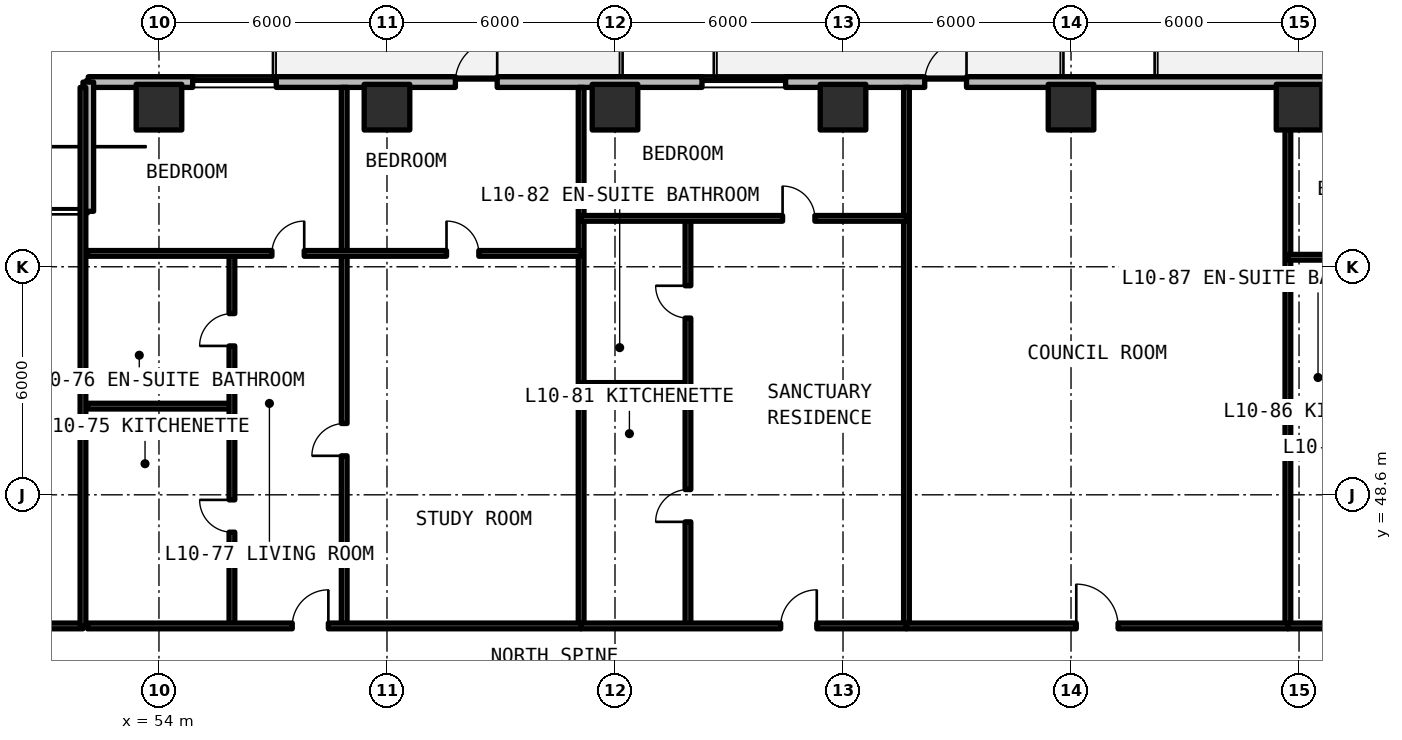
"""IFC4 building model, lengths in metres.
Left out: names, types, materials, properties, quantities, classifications, styles, units other than length and angle.
Written with IfcOpenShell. Run it as: python <this file> out.ifc"""

import sys

from ifc_helpers import new_model, si_unit, direction, frame, frame_2d, origin, origin_2d, place, context, subcontext, project, spatial, rectangle, extrude, element, fill, save


model = new_model("IFC4")
c1 = context("Model", 3, precision=1e-05, world=origin(), true_north=direction((0.0, 1.0)))
c2 = subcontext(c1, "Body", "Model", "MODEL_VIEW")
j1 = project(units=[si_unit("LENGTHUNIT", "METRE"), si_unit("PLANEANGLEUNIT", "RADIAN")], contexts=[c1])
p1 = place(None, origin())
s1 = spatial("IfcSite", under=j1, at=p1, CompositionType="ELEMENT")
p2 = place(p1, origin())
s2 = spatial("IfcBuilding", under=s1, at=p2, CompositionType="ELEMENT")
p3 = place(p2, frame((0.0, 0.0, 38.94)))
s3 = spatial("IfcBuildingStorey", under=s2, at=p3, CompositionType="ELEMENT", Elevation=38.94)
for number, where, z_axis, x_axis in (
    (1, (54.0, 58.8, 0.0), (0.0, 0.0, 1.0), (1.0, 0.0, 0.0)),
    (2, (60.0, 58.8, 0.0), (0.0, 0.0, 1.0), (1.0, 0.0, 0.0)),
    (3, (66.0, 58.8, 0.0), (0.0, 0.0, 1.0), (1.0, 0.0, 0.0)),
    (4, (72.0, 58.8, 0.0), (0.0, 0.0, 1.0), (1.0, 0.0, 0.0)),
    (5, (78.0, 58.8, 0.0), (0.0, 0.0, 1.0), (1.0, 0.0, 0.0)),
    (6, (84.0, 58.8, 0.0), (0.0, 0.0, 1.0), (1.0, 0.0, 0.0)),
):
    element("IfcColumn", number, at=place(p3, frame(where, z_axis=z_axis, x_axis=x_axis)), inside=s3, PredefinedType="COLUMN", context=c2, shape_type="SweptSolid", body=[
        extrude(rectangle(XDim=1.2, YDim=1.2, at=origin_2d()), origin(), (0.0, 0.0, 1.0), 3.3),
    ])
p4 = place(p3, frame((96.542, 59.46, 0.0), z_axis=(0.0, 0.0, 1.0), x_axis=(-1.0, 0.0, 0.0)))
e7 = element("IfcWall", 7, at=p4, inside=s3, PredefinedType="SOLIDWALL", context=c2, shape_type="SweptSolid", body=[
    extrude(rectangle(XDim=44.402, YDim=0.28, at=frame_2d((22.201, 0.0))), origin(), (0.0, 0.0, 1.0), 3.08),
])
p5 = place(p4, frame((33.642, 0.0, 0.0)))
e8 = element("IfcOpeningElement", 8, at=p5, cuts=e7, PredefinedType="OPENING", context=c2, shape_type="SweptSolid", body=[
    extrude(rectangle(XDim=1.1, YDim=2.15, at=frame_2d((0.55, 1.075))), frame((0.0, 0.15, 0.0), z_axis=(0.0, -1.0, 0.0), x_axis=(1.0, 0.0, 0.0)), (0.0, 0.0, 1.0), 0.3),
])
p6 = place(p4, frame((21.292, 0.0, 0.0)))
e9 = element("IfcOpeningElement", 9, at=p6, cuts=e7, PredefinedType="OPENING", context=c2, shape_type="SweptSolid", body=[
    extrude(rectangle(XDim=1.1, YDim=2.15, at=frame_2d((0.55, 1.075))), frame((0.0, 0.15, 0.0), z_axis=(0.0, -1.0, 0.0), x_axis=(1.0, 0.0, 0.0)), (0.0, 0.0, 1.0), 0.3),
])
p7 = place(p4, frame((9.692, 0.0, 0.0)))
e10 = element("IfcOpeningElement", 10, at=p7, cuts=e7, PredefinedType="OPENING", context=c2, shape_type="SweptSolid", body=[
    extrude(rectangle(XDim=1.1, YDim=2.15, at=frame_2d((0.55, 1.075))), frame((0.0, 0.15, 0.0), z_axis=(0.0, -1.0, 0.0), x_axis=(1.0, 0.0, 0.0)), (0.0, 0.0, 1.0), 0.3),
])
p8 = place(p4, frame((39.455, 0.0, 0.78)))
e11 = element("IfcOpeningElement", 11, at=p8, cuts=e7, PredefinedType="OPENING", context=c2, shape_type="SweptSolid", body=[
    extrude(rectangle(XDim=2.2, YDim=1.66, at=frame_2d((1.1, 0.83))), frame((0.0, 0.15, 0.0), z_axis=(0.0, -1.0, 0.0), x_axis=(1.0, 0.0, 0.0)), (0.0, 0.0, 1.0), 0.3),
])
p9 = place(p4, frame((26.053, 0.0, 0.78)))
e12 = element("IfcOpeningElement", 12, at=p9, cuts=e7, PredefinedType="OPENING", context=c2, shape_type="SweptSolid", body=[
    extrude(rectangle(XDim=2.2, YDim=1.66, at=frame_2d((1.1, 0.83))), frame((0.0, 0.15, 0.0), z_axis=(0.0, -1.0, 0.0), x_axis=(1.0, 0.0, 0.0)), (0.0, 0.0, 1.0), 0.3),
])
p10 = place(p4, frame((2.098, 0.0, 0.78)))
e13 = element("IfcOpeningElement", 13, at=p10, cuts=e7, PredefinedType="OPENING", context=c2, shape_type="SweptSolid", body=[
    extrude(rectangle(XDim=2.2, YDim=1.66, at=frame_2d((1.1, 0.83))), frame((0.0, 0.15, 0.0), z_axis=(0.0, -1.0, 0.0), x_axis=(1.0, 0.0, 0.0)), (0.0, 0.0, 1.0), 0.3),
])
p11 = place(p3, frame((52.14, 59.46, 0.0), z_axis=(0.0, 0.0, 1.0), x_axis=(0.0, -1.0, 0.0)))
e14 = element("IfcWall", 14, at=p11, inside=s3, PredefinedType="SOLIDWALL", context=c2, shape_type="SweptSolid", body=[
    extrude(rectangle(XDim=3.4, YDim=0.28, at=frame_2d((1.7, 0.0))), origin(), (0.0, 0.0, 1.0), 3.08),
])
p12 = place(p3, frame((43.6, 45.15, 0.0), z_axis=(0.0, 0.0, 1.0), x_axis=(1.0, 0.0, 0.0)))
e15 = element("IfcWall", 15, at=p12, inside=s3, PredefinedType="SOLIDWALL", context=c2, shape_type="SweptSolid", body=[
    extrude(rectangle(XDim=8.4, YDim=0.15, at=frame_2d((4.2, 0.0))), origin(), (0.0, 0.0, 1.0), 2.35),
])
p13 = place(p12, frame((3.65, 0.0, 0.0)))
e16 = element("IfcOpeningElement", 16, at=p13, cuts=e15, PredefinedType="OPENING", context=c2, shape_type="SweptSolid", body=[
    extrude(rectangle(XDim=1.1, YDim=2.15, at=frame_2d((0.55, 1.075))), frame((0.0, 0.085, 0.0), z_axis=(0.0, -1.0, 0.0), x_axis=(1.0, 0.0, 0.0)), (0.0, 0.0, 1.0), 0.17),
])
for number, where, z_axis, x_axis in (
    (17, (52.0, 45.15, 0.0), (0.0, 0.0, 1.0), (0.0, 1.0, 0.0)),
    (18, (65.109, 45.15, 0.0), (0.0, 0.0, 1.0), (0.0, 1.0, 0.0)),
):
    element("IfcWall", number, at=place(p3, frame(where, z_axis=z_axis, x_axis=x_axis)), inside=s3, PredefinedType="SOLIDWALL", context=c2, shape_type="SweptSolid", body=[
        extrude(rectangle(XDim=14.17, YDim=0.15, at=frame_2d((7.085, 0.0))), origin(), (0.0, 0.0, 1.0), 2.35),
    ])
p14 = place(p3, frame((58.874, 45.15, 0.0), z_axis=(0.0, 0.0, 1.0), x_axis=(0.0, 1.0, 0.0)))
e19 = element("IfcWall", 19, at=p14, inside=s3, PredefinedType="PARTITIONING", context=c2, shape_type="SweptSolid", body=[
    extrude(rectangle(XDim=9.802, YDim=0.15, at=frame_2d((4.901, 0.0))), origin(), (0.0, 0.0, 1.0), 2.35),
])
p15 = place(p14, frame((4.476, 0.0, 0.0)))
e20 = element("IfcOpeningElement", 20, at=p15, cuts=e19, PredefinedType="OPENING", context=c2, shape_type="SweptSolid", body=[
    extrude(rectangle(XDim=0.85, YDim=2.1, at=frame_2d((0.425, 1.05))), frame((0.0, 0.085, 0.0), z_axis=(0.0, -1.0, 0.0), x_axis=(1.0, 0.0, 0.0)), (0.0, 0.0, 1.0), 0.17),
])
p16 = place(p3, frame((52.12, 50.933, 0.0), z_axis=(0.0, 0.0, 1.0), x_axis=(1.0, 0.0, 0.0)))
e21 = element("IfcWall", 21, at=p16, inside=s3, PredefinedType="PARTITIONING", context=c2, shape_type="SweptSolid", body=[
    extrude(rectangle(XDim=3.8, YDim=0.15, at=frame_2d((1.9, 0.0))), origin(), (0.0, 0.0, 1.0), 2.35),
])
p17 = place(p3, frame((55.92, 45.15, 0.0), z_axis=(0.0, 0.0, 1.0), x_axis=(0.0, 1.0, 0.0)))
e22 = element("IfcWall", 22, at=p17, inside=s3, PredefinedType="PARTITIONING", context=c2, shape_type="SweptSolid", body=[
    extrude(rectangle(XDim=9.802, YDim=0.15, at=frame_2d((4.901, 0.0))), origin(), (0.0, 0.0, 1.0), 2.35),
])
p18 = place(p17, frame((2.467, 0.0, 0.0)))
e23 = element("IfcOpeningElement", 23, at=p18, cuts=e22, PredefinedType="OPENING", context=c2, shape_type="SweptSolid", body=[
    extrude(rectangle(XDim=0.85, YDim=2.1, at=frame_2d((0.425, 1.05))), frame((0.0, 0.085, 0.0), z_axis=(0.0, -1.0, 0.0), x_axis=(1.0, 0.0, 0.0)), (0.0, 0.0, 1.0), 0.17),
])
p19 = place(p17, frame((7.368, 0.0, 0.0)))
e24 = element("IfcOpeningElement", 24, at=p19, cuts=e22, PredefinedType="OPENING", context=c2, shape_type="SweptSolid", body=[
    extrude(rectangle(XDim=0.85, YDim=2.1, at=frame_2d((0.425, 1.05))), frame((0.0, 0.085, 0.0), z_axis=(0.0, -1.0, 0.0), x_axis=(1.0, 0.0, 0.0)), (0.0, 0.0, 1.0), 0.17),
])
p20 = place(p3, frame((58.874, 54.952, 0.0), z_axis=(0.0, 0.0, 1.0), x_axis=(0.0, 1.0, 0.0)))
e25 = element("IfcWall", 25, at=p20, inside=s3, PredefinedType="PARTITIONING", context=c2, shape_type="SweptSolid", body=[
    extrude(rectangle(XDim=4.368, YDim=0.15, at=frame_2d((2.184, 0.0))), origin(), (0.0, 0.0, 1.0), 2.35),
])
p21 = place(p3, frame((52.12, 54.952, 0.0), z_axis=(0.0, 0.0, 1.0), x_axis=(1.0, 0.0, 0.0)))
e26 = element("IfcWall", 26, at=p21, inside=s3, PredefinedType="PARTITIONING", context=c2, shape_type="SweptSolid", body=[
    extrude(rectangle(XDim=12.989, YDim=0.15, at=frame_2d((6.494, 0.0))), origin(), (0.0, 0.0, 1.0), 2.35),
])
p22 = place(p21, frame((4.852, 0.0, 0.0)))
e27 = element("IfcOpeningElement", 27, at=p22, cuts=e26, PredefinedType="OPENING", context=c2, shape_type="SweptSolid", body=[
    extrude(rectangle(XDim=0.85, YDim=2.1, at=frame_2d((0.425, 1.05))), frame((0.0, 0.085, 0.0), z_axis=(0.0, -1.0, 0.0), x_axis=(1.0, 0.0, 0.0)), (0.0, 0.0, 1.0), 0.17),
])
p23 = place(p21, frame((9.447, 0.0, 0.0)))
e28 = element("IfcOpeningElement", 28, at=p23, cuts=e26, PredefinedType="OPENING", context=c2, shape_type="SweptSolid", body=[
    extrude(rectangle(XDim=0.85, YDim=2.1, at=frame_2d((0.425, 1.05))), frame((0.0, 0.085, 0.0), z_axis=(0.0, -1.0, 0.0), x_axis=(1.0, 0.0, 0.0)), (0.0, 0.0, 1.0), 0.17),
])
p24 = place(p3, frame((52.12, 45.15, 0.0), z_axis=(0.0, 0.0, 1.0), x_axis=(1.0, 0.0, 0.0)))
e29 = element("IfcWall", 29, at=p24, inside=s3, PredefinedType="SOLIDWALL", context=c2, shape_type="SweptSolid", body=[
    extrude(rectangle(XDim=12.989, YDim=0.15, at=frame_2d((6.494, 0.0))), origin(), (0.0, 0.0, 1.0), 2.35),
])
p25 = place(p24, frame((5.387, 0.0, 0.0)))
e30 = element("IfcOpeningElement", 30, at=p25, cuts=e29, PredefinedType="OPENING", context=c2, shape_type="SweptSolid", body=[
    extrude(rectangle(XDim=0.95, YDim=2.15, at=frame_2d((0.475, 1.075))), frame((0.0, 0.085, 0.0), z_axis=(0.0, -1.0, 0.0), x_axis=(1.0, 0.0, 0.0)), (0.0, 0.0, 1.0), 0.17),
])
p26 = place(p3, frame((73.67, 45.15, 0.0), z_axis=(0.0, 0.0, 1.0), x_axis=(0.0, 1.0, 0.0)))
e31 = element("IfcWall", 31, at=p26, inside=s3, PredefinedType="SOLIDWALL", context=c2, shape_type="SweptSolid", body=[
    extrude(rectangle(XDim=14.17, YDim=0.15, at=frame_2d((7.085, 0.0))), origin(), (0.0, 0.0, 1.0), 2.35),
])
p27 = place(p3, frame((65.109, 51.477, 0.0), z_axis=(0.0, 0.0, 1.0), x_axis=(1.0, 0.0, 0.0)))
e32 = element("IfcWall", 32, at=p27, inside=s3, PredefinedType="PARTITIONING", context=c2, shape_type="SweptSolid", body=[
    extrude(rectangle(XDim=2.811, YDim=0.15, at=frame_2d((1.406, 0.0))), origin(), (0.0, 0.0, 1.0), 2.35),
])
p28 = place(p3, frame((67.92, 45.15, 0.0), z_axis=(0.0, 0.0, 1.0), x_axis=(0.0, 1.0, 0.0)))
e33 = element("IfcWall", 33, at=p28, inside=s3, PredefinedType="PARTITIONING", context=c2, shape_type="SweptSolid", body=[
    extrude(rectangle(XDim=10.724, YDim=0.15, at=frame_2d((5.362, 0.0))), origin(), (0.0, 0.0, 1.0), 2.35),
])
p29 = place(p28, frame((2.739, 0.0, 0.0)))
e34 = element("IfcOpeningElement", 34, at=p29, cuts=e33, PredefinedType="OPENING", context=c2, shape_type="SweptSolid", body=[
    extrude(rectangle(XDim=0.85, YDim=2.1, at=frame_2d((0.425, 1.05))), frame((0.0, 0.085, 0.0), z_axis=(0.0, -1.0, 0.0), x_axis=(1.0, 0.0, 0.0)), (0.0, 0.0, 1.0), 0.17),
])
p30 = place(p28, frame((8.101, 0.0, 0.0)))
e35 = element("IfcOpeningElement", 35, at=p30, cuts=e33, PredefinedType="OPENING", context=c2, shape_type="SweptSolid", body=[
    extrude(rectangle(XDim=0.85, YDim=2.1, at=frame_2d((0.425, 1.05))), frame((0.0, 0.085, 0.0), z_axis=(0.0, -1.0, 0.0), x_axis=(1.0, 0.0, 0.0)), (0.0, 0.0, 1.0), 0.17),
])
p31 = place(p3, frame((65.109, 55.874, 0.0), z_axis=(0.0, 0.0, 1.0), x_axis=(1.0, 0.0, 0.0)))
e36 = element("IfcWall", 36, at=p31, inside=s3, PredefinedType="PARTITIONING", context=c2, shape_type="SweptSolid", body=[
    extrude(rectangle(XDim=8.561, YDim=0.15, at=frame_2d((4.28, 0.0))), origin(), (0.0, 0.0, 1.0), 2.35),
])
p32 = place(p31, frame((5.301, 0.0, 0.0)))
e37 = element("IfcOpeningElement", 37, at=p32, cuts=e36, PredefinedType="OPENING", context=c2, shape_type="SweptSolid", body=[
    extrude(rectangle(XDim=0.85, YDim=2.1, at=frame_2d((0.425, 1.05))), frame((0.0, 0.085, 0.0), z_axis=(0.0, -1.0, 0.0), x_axis=(1.0, 0.0, 0.0)), (0.0, 0.0, 1.0), 0.17),
])
p33 = place(p3, frame((65.109, 45.15, 0.0), z_axis=(0.0, 0.0, 1.0), x_axis=(1.0, 0.0, 0.0)))
e38 = element("IfcWall", 38, at=p33, inside=s3, PredefinedType="SOLIDWALL", context=c2, shape_type="SweptSolid", body=[
    extrude(rectangle(XDim=8.561, YDim=0.15, at=frame_2d((4.28, 0.0))), origin(), (0.0, 0.0, 1.0), 2.35),
])
p34 = place(p33, frame((5.251, 0.0, 0.0)))
e39 = element("IfcOpeningElement", 39, at=p34, cuts=e38, PredefinedType="OPENING", context=c2, shape_type="SweptSolid", body=[
    extrude(rectangle(XDim=0.95, YDim=2.15, at=frame_2d((0.475, 1.075))), frame((0.0, 0.085, 0.0), z_axis=(0.0, -1.0, 0.0), x_axis=(1.0, 0.0, 0.0)), (0.0, 0.0, 1.0), 0.17),
])
p35 = place(p3, frame((83.706, 45.15, 0.0), z_axis=(0.0, 0.0, 1.0), x_axis=(0.0, 1.0, 0.0)))
e40 = element("IfcWall", 40, at=p35, inside=s3, PredefinedType="SOLIDWALL", context=c2, shape_type="SweptSolid", body=[
    extrude(rectangle(XDim=14.17, YDim=0.15, at=frame_2d((7.085, 0.0))), origin(), (0.0, 0.0, 1.0), 2.35),
])
p36 = place(p3, frame((73.67, 45.15, 0.0), z_axis=(0.0, 0.0, 1.0), x_axis=(1.0, 0.0, 0.0)))
e41 = element("IfcWall", 41, at=p36, inside=s3, PredefinedType="SOLIDWALL", context=c2, shape_type="SweptSolid", body=[
    extrude(rectangle(XDim=10.037, YDim=0.15, at=frame_2d((5.018, 0.0))), origin(), (0.0, 0.0, 1.0), 2.35),
])
p37 = place(p36, frame((4.469, 0.0, 0.0)))
e42 = element("IfcOpeningElement", 42, at=p37, cuts=e41, PredefinedType="OPENING", context=c2, shape_type="SweptSolid", body=[
    extrude(rectangle(XDim=1.1, YDim=2.15, at=frame_2d((0.55, 1.075))), frame((0.0, 0.085, 0.0), z_axis=(0.0, -1.0, 0.0), x_axis=(1.0, 0.0, 0.0)), (0.0, 0.0, 1.0), 0.17),
])
p38 = place(p3, frame((83.706, 50.874, 0.0), z_axis=(0.0, 0.0, 1.0), x_axis=(1.0, 0.0, 0.0)))
e43 = element("IfcWall", 43, at=p38, inside=s3, PredefinedType="PARTITIONING", context=c2, shape_type="SweptSolid", body=[
    extrude(rectangle(XDim=2.35, YDim=0.15, at=frame_2d((1.175, 0.0))), origin(), (0.0, 0.0, 1.0), 2.35),
])
p39 = place(p3, frame((83.706, 54.851, 0.0), z_axis=(0.0, 0.0, 1.0), x_axis=(1.0, 0.0, 0.0)))
e44 = element("IfcWall", 44, at=p39, inside=s3, PredefinedType="PARTITIONING", context=c2, shape_type="SweptSolid", body=[
    extrude(rectangle(XDim=12.694, YDim=0.15, at=frame_2d((6.347, 0.0))), origin(), (0.0, 0.0, 1.0), 2.35),
])
p40 = place(p39, frame((4.05, 0.0, 0.0)))
e45 = element("IfcOpeningElement", 45, at=p40, cuts=e44, PredefinedType="OPENING", context=c2, shape_type="SweptSolid", body=[
    extrude(rectangle(XDim=0.85, YDim=2.1, at=frame_2d((0.425, 1.05))), frame((0.0, 0.085, 0.0), z_axis=(0.0, -1.0, 0.0), x_axis=(1.0, 0.0, 0.0)), (0.0, 0.0, 1.0), 0.17),
])
p41 = place(p39, frame((9.222, 0.0, 0.0)))
e46 = element("IfcOpeningElement", 46, at=p41, cuts=e44, PredefinedType="OPENING", context=c2, shape_type="SweptSolid", body=[
    extrude(rectangle(XDim=0.85, YDim=2.1, at=frame_2d((0.425, 1.05))), frame((0.0, 0.085, 0.0), z_axis=(0.0, -1.0, 0.0), x_axis=(1.0, 0.0, 0.0)), (0.0, 0.0, 1.0), 0.17),
])
p42 = place(p3, frame((83.706, 45.15, 0.0), z_axis=(0.0, 0.0, 1.0), x_axis=(1.0, 0.0, 0.0)))
e47 = element("IfcWall", 47, at=p42, inside=s3, PredefinedType="SOLIDWALL", context=c2, shape_type="SweptSolid", body=[
    extrude(rectangle(XDim=12.694, YDim=0.15, at=frame_2d((6.347, 0.0))), origin(), (0.0, 0.0, 1.0), 2.35),
])
p43 = place(p42, frame((4.526, 0.0, 0.0)))
e48 = element("IfcOpeningElement", 48, at=p43, cuts=e47, PredefinedType="OPENING", context=c2, shape_type="SweptSolid", body=[
    extrude(rectangle(XDim=0.95, YDim=2.15, at=frame_2d((0.475, 1.075))), frame((0.0, 0.085, 0.0), z_axis=(0.0, -1.0, 0.0), x_axis=(1.0, 0.0, 0.0)), (0.0, 0.0, 1.0), 0.17),
])
p44 = place(p5, frame((1.1, 0.0, 0.0), z_axis=(0.0, 0.0, 1.0), x_axis=(-1.0, 0.0, 0.0)))
e49 = element("IfcDoor", 49, at=p44, inside=s3, OperationType="SINGLE_SWING_LEFT", PredefinedType="DOOR", context=c2, shape_type="SweptSolid", body=[
    extrude(rectangle(XDim=1.1, YDim=2.15, at=frame_2d((0.55, 1.075))), frame((0.0, 0.025, 0.0), z_axis=(0.0, -1.0, 0.0), x_axis=(1.0, 0.0, 0.0)), (0.0, 0.0, 1.0), 0.05),
])
fill(e8, e49)
p45 = place(p6, frame((1.1, 0.0, 0.0), z_axis=(0.0, 0.0, 1.0), x_axis=(-1.0, 0.0, 0.0)))
e50 = element("IfcDoor", 50, at=p45, inside=s3, OperationType="SINGLE_SWING_RIGHT", PredefinedType="DOOR", context=c2, shape_type="SweptSolid", body=[
    extrude(rectangle(XDim=1.1, YDim=2.15, at=frame_2d((0.55, 1.075))), frame((0.0, 0.025, 0.0), z_axis=(0.0, -1.0, 0.0), x_axis=(1.0, 0.0, 0.0)), (0.0, 0.0, 1.0), 0.05),
])
fill(e9, e50)
p46 = place(p8, origin())
e51 = element("IfcWindow", 51, at=p46, inside=s3, PartitioningType="SINGLE_PANEL", PredefinedType="WINDOW", context=c2, shape_type="SweptSolid", body=[
    extrude(rectangle(XDim=2.2, YDim=1.66, at=frame_2d((1.1, 0.83))), frame((0.0, 0.03, 0.0), z_axis=(0.0, -1.0, 0.0), x_axis=(1.0, 0.0, 0.0)), (0.0, 0.0, 1.0), 0.06),
])
fill(e11, e51)
p47 = place(p9, origin())
e52 = element("IfcWindow", 52, at=p47, inside=s3, PartitioningType="SINGLE_PANEL", PredefinedType="WINDOW", context=c2, shape_type="SweptSolid", body=[
    extrude(rectangle(XDim=2.2, YDim=1.66, at=frame_2d((1.1, 0.83))), frame((0.0, 0.03, 0.0), z_axis=(0.0, -1.0, 0.0), x_axis=(1.0, 0.0, 0.0)), (0.0, 0.0, 1.0), 0.06),
])
fill(e12, e52)
p48 = place(p15, origin())
e53 = element("IfcDoor", 53, at=p48, inside=s3, OperationType="SINGLE_SWING_LEFT", PredefinedType="DOOR", context=c2, shape_type="SweptSolid", body=[
    extrude(rectangle(XDim=0.85, YDim=2.1, at=frame_2d((0.425, 1.05))), frame((0.0, 0.025, 0.0), z_axis=(0.0, -1.0, 0.0), x_axis=(1.0, 0.0, 0.0)), (0.0, 0.0, 1.0), 0.05),
])
fill(e20, e53)
p49 = place(p18, origin())
e54 = element("IfcDoor", 54, at=p49, inside=s3, OperationType="SINGLE_SWING_RIGHT", PredefinedType="DOOR", context=c2, shape_type="SweptSolid", body=[
    extrude(rectangle(XDim=0.85, YDim=2.1, at=frame_2d((0.425, 1.05))), frame((0.0, 0.025, 0.0), z_axis=(0.0, -1.0, 0.0), x_axis=(1.0, 0.0, 0.0)), (0.0, 0.0, 1.0), 0.05),
])
fill(e23, e54)
p50 = place(p19, origin())
e55 = element("IfcDoor", 55, at=p50, inside=s3, OperationType="SINGLE_SWING_LEFT", PredefinedType="DOOR", context=c2, shape_type="SweptSolid", body=[
    extrude(rectangle(XDim=0.85, YDim=2.1, at=frame_2d((0.425, 1.05))), frame((0.0, 0.025, 0.0), z_axis=(0.0, -1.0, 0.0), x_axis=(1.0, 0.0, 0.0)), (0.0, 0.0, 1.0), 0.05),
])
fill(e24, e55)
p51 = place(p22, origin())
e56 = element("IfcDoor", 56, at=p51, inside=s3, OperationType="SINGLE_SWING_RIGHT", PredefinedType="DOOR", context=c2, shape_type="SweptSolid", body=[
    extrude(rectangle(XDim=0.85, YDim=2.1, at=frame_2d((0.425, 1.05))), frame((0.0, 0.025, 0.0), z_axis=(0.0, -1.0, 0.0), x_axis=(1.0, 0.0, 0.0)), (0.0, 0.0, 1.0), 0.05),
])
fill(e27, e56)
p52 = place(p23, origin())
e57 = element("IfcDoor", 57, at=p52, inside=s3, OperationType="SINGLE_SWING_LEFT", PredefinedType="DOOR", context=c2, shape_type="SweptSolid", body=[
    extrude(rectangle(XDim=0.85, YDim=2.1, at=frame_2d((0.425, 1.05))), frame((0.0, 0.025, 0.0), z_axis=(0.0, -1.0, 0.0), x_axis=(1.0, 0.0, 0.0)), (0.0, 0.0, 1.0), 0.05),
])
fill(e28, e57)
p53 = place(p25, origin())
e58 = element("IfcDoor", 58, at=p53, inside=s3, OperationType="SINGLE_SWING_RIGHT", PredefinedType="DOOR", context=c2, shape_type="SweptSolid", body=[
    extrude(rectangle(XDim=0.95, YDim=2.15, at=frame_2d((0.475, 1.075))), frame((0.0, 0.025, 0.0), z_axis=(0.0, -1.0, 0.0), x_axis=(1.0, 0.0, 0.0)), (0.0, 0.0, 1.0), 0.05),
])
fill(e30, e58)
p54 = place(p29, origin())
e59 = element("IfcDoor", 59, at=p54, inside=s3, OperationType="SINGLE_SWING_LEFT", PredefinedType="DOOR", context=c2, shape_type="SweptSolid", body=[
    extrude(rectangle(XDim=0.85, YDim=2.1, at=frame_2d((0.425, 1.05))), frame((0.0, 0.025, 0.0), z_axis=(0.0, -1.0, 0.0), x_axis=(1.0, 0.0, 0.0)), (0.0, 0.0, 1.0), 0.05),
])
fill(e34, e59)
p55 = place(p30, origin())
e60 = element("IfcDoor", 60, at=p55, inside=s3, OperationType="SINGLE_SWING_RIGHT", PredefinedType="DOOR", context=c2, shape_type="SweptSolid", body=[
    extrude(rectangle(XDim=0.85, YDim=2.1, at=frame_2d((0.425, 1.05))), frame((0.0, 0.025, 0.0), z_axis=(0.0, -1.0, 0.0), x_axis=(1.0, 0.0, 0.0)), (0.0, 0.0, 1.0), 0.05),
])
fill(e35, e60)
p56 = place(p32, origin())
e61 = element("IfcDoor", 61, at=p56, inside=s3, OperationType="SINGLE_SWING_LEFT", PredefinedType="DOOR", context=c2, shape_type="SweptSolid", body=[
    extrude(rectangle(XDim=0.85, YDim=2.1, at=frame_2d((0.425, 1.05))), frame((0.0, 0.025, 0.0), z_axis=(0.0, -1.0, 0.0), x_axis=(1.0, 0.0, 0.0)), (0.0, 0.0, 1.0), 0.05),
])
fill(e37, e61)
p57 = place(p34, origin())
e62 = element("IfcDoor", 62, at=p57, inside=s3, OperationType="SINGLE_SWING_RIGHT", PredefinedType="DOOR", context=c2, shape_type="SweptSolid", body=[
    extrude(rectangle(XDim=0.95, YDim=2.15, at=frame_2d((0.475, 1.075))), frame((0.0, 0.025, 0.0), z_axis=(0.0, -1.0, 0.0), x_axis=(1.0, 0.0, 0.0)), (0.0, 0.0, 1.0), 0.05),
])
fill(e39, e62)
p58 = place(p37, origin())
e63 = element("IfcDoor", 63, at=p58, inside=s3, OperationType="SINGLE_SWING_LEFT", PredefinedType="DOOR", context=c2, shape_type="SweptSolid", body=[
    extrude(rectangle(XDim=1.1, YDim=2.15, at=frame_2d((0.55, 1.075))), frame((0.0, 0.025, 0.0), z_axis=(0.0, -1.0, 0.0), x_axis=(1.0, 0.0, 0.0)), (0.0, 0.0, 1.0), 0.05),
])
fill(e42, e63)
save(model, sys.argv[1])
